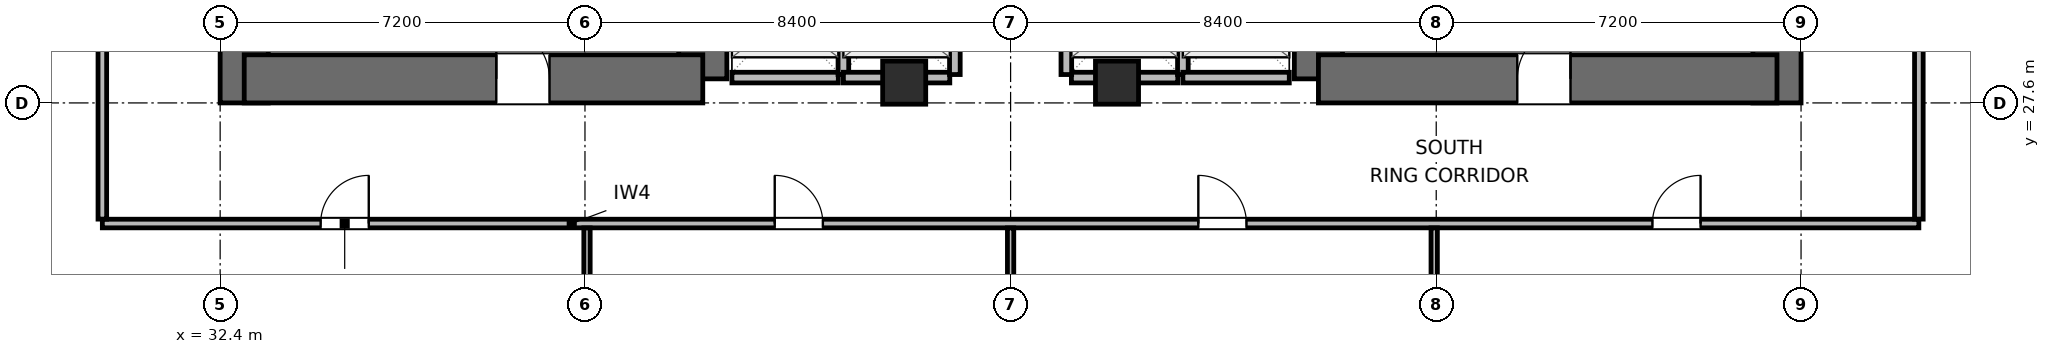
"""IFC4 building model, lengths in metres.
Left out: names, types, materials, properties, quantities, classifications, styles, units other than length and angle.
Written with IfcOpenShell. Run it as: python <this file> out.ifc"""

import sys

from ifc_helpers import new_model, si_unit, direction, frame, frame_2d, origin, origin_2d, place, context, subcontext, project, spatial, rectangle, extrude, element, fill, save


model = new_model("IFC4")
c1 = context("Model", 3, precision=1e-05, world=origin(), true_north=direction((0.0, 1.0)))
c2 = subcontext(c1, "Body", "Model", "MODEL_VIEW")
j1 = project(units=[si_unit("LENGTHUNIT", "METRE"), si_unit("PLANEANGLEUNIT", "RADIAN")], contexts=[c1])
p1 = place(None, origin())
s1 = spatial("IfcSite", under=j1, at=p1, CompositionType="ELEMENT")
p2 = place(p1, origin())
s2 = spatial("IfcBuilding", under=s1, at=p2, CompositionType="ELEMENT")
p3 = place(p2, frame((0.0, 0.0, 33.3)))
s3 = spatial("IfcBuildingStorey", under=s2, at=p3, CompositionType="ELEMENT", Elevation=33.3)
p4 = place(p3, frame((32.875, 27.6, 0.0), z_axis=(0.0, 0.0, 1.0), x_axis=(0.0, 1.0, 0.0)))
e1 = element("IfcWall", 1, at=p4, inside=s3, PredefinedType="SHEAR", context=c2, shape_type="SweptSolid", body=[
    extrude(rectangle(XDim=16.8, YDim=0.95, at=frame_2d((8.4, 0.0))), origin(), (0.0, 0.0, 1.0), 3.9),
])
p5 = place(p3, frame((41.925, 28.075, 0.0), z_axis=(0.0, 0.0, 1.0), x_axis=(0.0, 1.0, 0.0)))
e2 = element("IfcWall", 2, at=p5, inside=s3, PredefinedType="SHEAR", context=c2, shape_type="SweptSolid", body=[
    extrude(rectangle(XDim=6.325, YDim=0.95, at=frame_2d((3.163, 0.0))), origin(), (0.0, 0.0, 1.0), 3.9),
])
p6 = place(p3, frame((32.875, 28.075, 0.0), z_axis=(0.0, 0.0, 1.0), x_axis=(1.0, 0.0, 0.0)))
e3 = element("IfcWall", 3, at=p6, inside=s3, PredefinedType="SHEAR", context=c2, shape_type="SweptSolid", body=[
    extrude(rectangle(XDim=9.05, YDim=0.95, at=frame_2d((4.525, 0.0))), origin(), (0.0, 0.0, 1.0), 3.9),
])
p7 = place(p6, frame((4.975, 0.0, 0.0)))
e4 = element("IfcOpeningElement", 4, at=p7, cuts=e3, PredefinedType="OPENING", context=c2, shape_type="SweptSolid", body=[
    extrude(rectangle(XDim=1.05, YDim=2.04, at=frame_2d((0.525, 1.02))), frame((0.0, 0.485, 0.0), z_axis=(0.0, -1.0, 0.0), x_axis=(1.0, 0.0, 0.0)), (0.0, 0.0, 1.0), 0.97),
])
p8 = place(p3, frame((54.075, 28.075, 0.0), z_axis=(0.0, 0.0, 1.0), x_axis=(0.0, 1.0, 0.0)))
e5 = element("IfcWall", 5, at=p8, inside=s3, PredefinedType="SHEAR", context=c2, shape_type="SweptSolid", body=[
    extrude(rectangle(XDim=7.725, YDim=0.95, at=frame_2d((3.863, 0.0))), origin(), (0.0, 0.0, 1.0), 3.9),
])
p9 = place(p3, frame((63.125, 27.6, 0.0), z_axis=(0.0, 0.0, 1.0), x_axis=(0.0, 1.0, 0.0)))
e6 = element("IfcWall", 6, at=p9, inside=s3, PredefinedType="SHEAR", context=c2, shape_type="SweptSolid", body=[
    extrude(rectangle(XDim=16.8, YDim=0.95, at=frame_2d((8.4, 0.0))), origin(), (0.0, 0.0, 1.0), 3.9),
])
p10 = place(p3, frame((54.075, 28.075, 0.0), z_axis=(0.0, 0.0, 1.0), x_axis=(1.0, 0.0, 0.0)))
e7 = element("IfcWall", 7, at=p10, inside=s3, PredefinedType="SHEAR", context=c2, shape_type="SweptSolid", body=[
    extrude(rectangle(XDim=9.05, YDim=0.95, at=frame_2d((4.525, 0.0))), origin(), (0.0, 0.0, 1.0), 3.9),
])
p11 = place(p10, frame((3.925, 0.0, 0.0)))
e8 = element("IfcOpeningElement", 8, at=p11, cuts=e7, PredefinedType="OPENING", context=c2, shape_type="SweptSolid", body=[
    extrude(rectangle(XDim=1.05, YDim=2.04, at=frame_2d((0.525, 1.02))), frame((0.0, 0.485, 0.0), z_axis=(0.0, -1.0, 0.0), x_axis=(1.0, 0.0, 0.0)), (0.0, 0.0, 1.0), 0.97),
])
for number, where, z_axis, x_axis in (
    (9, (45.9, 28.0, 0.0), (0.0, 0.0, 1.0), (1.0, 0.0, 0.0)),
    (10, (50.1, 28.0, 0.0), (0.0, 0.0, 1.0), (1.0, 0.0, 0.0)),
):
    element("IfcColumn", number, at=place(p3, frame(where, z_axis=z_axis, x_axis=x_axis)), inside=s3, PredefinedType="COLUMN", context=c2, shape_type="SweptSolid", body=[
        extrude(rectangle(XDim=0.85, YDim=0.85, at=origin_2d()), origin(), (0.0, 0.0, 1.0), 3.9),
    ])
p12 = place(p3, frame((42.5, 28.1, 0.0), z_axis=(0.0, 0.0, 1.0), x_axis=(1.0, 0.0, 0.0)))
e11 = element("IfcWall", 11, at=p12, inside=s3, PredefinedType="PARTITIONING", context=c2, shape_type="SweptSolid", body=[
    extrude(rectangle(XDim=2.1, YDim=0.21, at=frame_2d((1.05, 0.0))), origin(), (0.0, 0.0, 1.0), 2.525),
])
p13 = place(p3, frame((44.7, 28.16, 0.0), z_axis=(0.0, 0.0, 1.0), x_axis=(0.0, 1.0, 0.0)))
e12 = element("IfcWall", 12, at=p13, inside=s3, PredefinedType="PARTITIONING", context=c2, shape_type="SweptSolid", body=[
    extrude(rectangle(XDim=2.28, YDim=0.21, at=frame_2d((1.14, 0.0))), origin(), (0.0, 0.0, 1.0), 3.64),
])
p14 = place(p3, frame((44.7, 28.1, 0.0), z_axis=(0.0, 0.0, 1.0), x_axis=(1.0, 0.0, 0.0)))
e13 = element("IfcWall", 13, at=p14, inside=s3, PredefinedType="PARTITIONING", context=c2, shape_type="SweptSolid", body=[
    extrude(rectangle(XDim=2.1, YDim=0.21, at=frame_2d((1.05, 0.0))), origin(), (0.0, 0.0, 1.0), 2.525),
])
p15 = place(p3, frame((46.9, 28.16, 0.0), z_axis=(0.0, 0.0, 1.0), x_axis=(0.0, 1.0, 0.0)))
e14 = element("IfcWall", 14, at=p15, inside=s3, PredefinedType="PARTITIONING", context=c2, shape_type="SweptSolid", body=[
    extrude(rectangle(XDim=2.28, YDim=0.21, at=frame_2d((1.14, 0.0))), origin(), (0.0, 0.0, 1.0), 3.64),
])
p16 = place(p3, frame((49.2, 28.1, 0.0), z_axis=(0.0, 0.0, 1.0), x_axis=(1.0, 0.0, 0.0)))
e15 = element("IfcWall", 15, at=p16, inside=s3, PredefinedType="PARTITIONING", context=c2, shape_type="SweptSolid", body=[
    extrude(rectangle(XDim=2.1, YDim=0.21, at=frame_2d((1.05, 0.0))), origin(), (0.0, 0.0, 1.0), 2.525),
])
for number, where, z_axis, x_axis in (
    (16, (49.1, 28.16, 0.0), (0.0, 0.0, 1.0), (0.0, 1.0, 0.0)),
    (17, (51.4, 28.16, 0.0), (0.0, 0.0, 1.0), (0.0, 1.0, 0.0)),
):
    element("IfcWall", number, at=place(p3, frame(where, z_axis=z_axis, x_axis=x_axis)), inside=s3, PredefinedType="PARTITIONING", context=c2, shape_type="SweptSolid", body=[
        extrude(rectangle(XDim=2.28, YDim=0.21, at=frame_2d((1.14, 0.0))), origin(), (0.0, 0.0, 1.0), 3.64),
    ])
p17 = place(p3, frame((51.4, 28.1, 0.0), z_axis=(0.0, 0.0, 1.0), x_axis=(1.0, 0.0, 0.0)))
e18 = element("IfcWall", 18, at=p17, inside=s3, PredefinedType="PARTITIONING", context=c2, shape_type="SweptSolid", body=[
    extrude(rectangle(XDim=2.1, YDim=0.21, at=frame_2d((1.05, 0.0))), origin(), (0.0, 0.0, 1.0), 2.525),
])
p18 = place(p3, frame((30.075, 25.22, 0.0), z_axis=(0.0, 0.0, 1.0), x_axis=(1.0, 0.0, 0.0)))
e19 = element("IfcWall", 19, at=p18, inside=s3, PredefinedType="PARTITIONING", context=c2, shape_type="SweptSolid", body=[
    extrude(rectangle(XDim=35.85, YDim=0.17, at=frame_2d((17.925, 0.0))), origin(), (0.0, 0.0, 1.0), 3.64),
])
p19 = place(p18, frame((4.308, 0.0, 0.0)))
e20 = element("IfcOpeningElement", 20, at=p19, cuts=e19, PredefinedType="OPENING", context=c2, shape_type="SweptSolid", body=[
    extrude(rectangle(XDim=0.95, YDim=2.04, at=frame_2d((0.475, 1.02))), frame((0.0, 0.095, 0.0), z_axis=(0.0, -1.0, 0.0), x_axis=(1.0, 0.0, 0.0)), (0.0, 0.0, 1.0), 0.19),
])
p20 = place(p18, frame((13.27, 0.0, 0.0)))
e21 = element("IfcOpeningElement", 21, at=p20, cuts=e19, PredefinedType="OPENING", context=c2, shape_type="SweptSolid", body=[
    extrude(rectangle(XDim=0.95, YDim=2.04, at=frame_2d((0.475, 1.02))), frame((0.0, 0.095, 0.0), z_axis=(0.0, -1.0, 0.0), x_axis=(1.0, 0.0, 0.0)), (0.0, 0.0, 1.0), 0.19),
])
p21 = place(p18, frame((21.63, 0.0, 0.0)))
e22 = element("IfcOpeningElement", 22, at=p21, cuts=e19, PredefinedType="OPENING", context=c2, shape_type="SweptSolid", body=[
    extrude(rectangle(XDim=0.95, YDim=2.04, at=frame_2d((0.475, 1.02))), frame((0.0, 0.095, 0.0), z_axis=(0.0, -1.0, 0.0), x_axis=(1.0, 0.0, 0.0)), (0.0, 0.0, 1.0), 0.19),
])
p22 = place(p18, frame((30.592, 0.0, 0.0)))
e23 = element("IfcOpeningElement", 23, at=p22, cuts=e19, PredefinedType="OPENING", context=c2, shape_type="SweptSolid", body=[
    extrude(rectangle(XDim=0.95, YDim=2.04, at=frame_2d((0.475, 1.02))), frame((0.0, 0.095, 0.0), z_axis=(0.0, -1.0, 0.0), x_axis=(1.0, 0.0, 0.0)), (0.0, 0.0, 1.0), 0.19),
])
p23 = place(p3, frame((30.075, 25.307, 0.0), z_axis=(0.0, 0.0, 1.0), x_axis=(0.0, 1.0, 0.0)))
e24 = element("IfcWall", 24, at=p23, inside=s3, PredefinedType="PARTITIONING", context=c2, shape_type="SweptSolid", body=[
    extrude(rectangle(XDim=21.386, YDim=0.17, at=frame_2d((10.693, 0.0))), origin(), (0.0, 0.0, 1.0), 3.64),
])
p24 = place(p23, frame((3.528, 0.0, 0.0)))
e25 = element("IfcOpeningElement", 25, at=p24, cuts=e24, PredefinedType="OPENING", context=c2, shape_type="SweptSolid", body=[
    extrude(rectangle(XDim=0.95, YDim=2.04, at=frame_2d((0.475, 1.02))), frame((0.0, 0.095, 0.0), z_axis=(0.0, -1.0, 0.0), x_axis=(1.0, 0.0, 0.0)), (0.0, 0.0, 1.0), 0.19),
])
p25 = place(p23, frame((10.818, 0.0, 0.0)))
e26 = element("IfcOpeningElement", 26, at=p25, cuts=e24, PredefinedType="OPENING", context=c2, shape_type="SweptSolid", body=[
    extrude(rectangle(XDim=0.95, YDim=2.04, at=frame_2d((0.475, 1.02))), frame((0.0, 0.095, 0.0), z_axis=(0.0, -1.0, 0.0), x_axis=(1.0, 0.0, 0.0)), (0.0, 0.0, 1.0), 0.19),
])
p26 = place(p23, frame((17.508, 0.0, 0.0)))
e27 = element("IfcOpeningElement", 27, at=p26, cuts=e24, PredefinedType="OPENING", context=c2, shape_type="SweptSolid", body=[
    extrude(rectangle(XDim=0.95, YDim=2.04, at=frame_2d((0.475, 1.02))), frame((0.0, 0.095, 0.0), z_axis=(0.0, -1.0, 0.0), x_axis=(1.0, 0.0, 0.0)), (0.0, 0.0, 1.0), 0.19),
])
p27 = place(p3, frame((65.925, 25.307, 0.0), z_axis=(0.0, 0.0, 1.0), x_axis=(0.0, 1.0, 0.0)))
e28 = element("IfcWall", 28, at=p27, inside=s3, PredefinedType="PARTITIONING", context=c2, shape_type="SweptSolid", body=[
    extrude(rectangle(XDim=21.386, YDim=0.17, at=frame_2d((10.693, 0.0))), origin(), (0.0, 0.0, 1.0), 3.64),
])
p28 = place(p27, frame((5.428, 0.0, 0.0)))
e29 = element("IfcOpeningElement", 29, at=p28, cuts=e28, PredefinedType="OPENING", context=c2, shape_type="SweptSolid", body=[
    extrude(rectangle(XDim=0.95, YDim=2.04, at=frame_2d((0.475, 1.02))), frame((0.0, 0.095, 0.0), z_axis=(0.0, -1.0, 0.0), x_axis=(1.0, 0.0, 0.0)), (0.0, 0.0, 1.0), 0.19),
])
p29 = place(p27, frame((16.208, 0.0, 0.0)))
e30 = element("IfcOpeningElement", 30, at=p29, cuts=e28, PredefinedType="OPENING", context=c2, shape_type="SweptSolid", body=[
    extrude(rectangle(XDim=0.95, YDim=2.04, at=frame_2d((0.475, 1.02))), frame((0.0, 0.095, 0.0), z_axis=(0.0, -1.0, 0.0), x_axis=(1.0, 0.0, 0.0)), (0.0, 0.0, 1.0), 0.19),
])
p30 = place(p3, frame((39.64, 9.915, 0.0), z_axis=(0.0, 0.0, 1.0), x_axis=(0.0, 1.0, 0.0)))
e31 = element("IfcWall", 31, at=p30, inside=s3, PredefinedType="PARTITIONING", context=c2, shape_type="SweptSolid", body=[
    extrude(rectangle(XDim=15.218, YDim=0.125, at=frame_2d((7.609, 0.0))), origin(), (0.0, 0.0, 1.0), 2.93),
])
p31 = place(p3, frame((48.0, 11.515, 0.0), z_axis=(0.0, 0.0, 1.0), x_axis=(0.0, 1.0, 0.0)))
e32 = element("IfcWall", 32, at=p31, inside=s3, PredefinedType="PARTITIONING", context=c2, shape_type="SweptSolid", body=[
    extrude(rectangle(XDim=13.618, YDim=0.125, at=frame_2d((6.809, 0.0))), origin(), (0.0, 0.0, 1.0), 2.93),
])
p32 = place(p3, frame((56.36, 9.915, 0.0), z_axis=(0.0, 0.0, 1.0), x_axis=(0.0, 1.0, 0.0)))
e33 = element("IfcWall", 33, at=p32, inside=s3, PredefinedType="PARTITIONING", context=c2, shape_type="SweptSolid", body=[
    extrude(rectangle(XDim=15.218, YDim=0.125, at=frame_2d((7.609, 0.0))), origin(), (0.0, 0.0, 1.0), 2.93),
])
p33 = place(p7, origin())
e34 = element("IfcDoor", 34, at=p33, inside=s3, OperationType="SINGLE_SWING_LEFT", PredefinedType="DOOR", context=c2, shape_type="SweptSolid", body=[
    extrude(rectangle(XDim=1.05, YDim=2.04, at=frame_2d((0.525, 1.02))), frame((0.0, 0.025, 0.0), z_axis=(0.0, -1.0, 0.0), x_axis=(1.0, 0.0, 0.0)), (0.0, 0.0, 1.0), 0.05),
])
fill(e4, e34)
p34 = place(p11, origin())
e35 = element("IfcDoor", 35, at=p34, inside=s3, OperationType="SINGLE_SWING_RIGHT", PredefinedType="DOOR", context=c2, shape_type="SweptSolid", body=[
    extrude(rectangle(XDim=1.05, YDim=2.04, at=frame_2d((0.525, 1.02))), frame((0.0, 0.025, 0.0), z_axis=(0.0, -1.0, 0.0), x_axis=(1.0, 0.0, 0.0)), (0.0, 0.0, 1.0), 0.05),
])
fill(e8, e35)
p35 = place(p19, origin())
e36 = element("IfcDoor", 36, at=p35, inside=s3, OperationType="SINGLE_SWING_RIGHT", PredefinedType="DOOR", context=c2, shape_type="SweptSolid", body=[
    extrude(rectangle(XDim=0.95, YDim=2.04, at=frame_2d((0.475, 1.02))), frame((0.0, 0.025, 0.0), z_axis=(0.0, -1.0, 0.0), x_axis=(1.0, 0.0, 0.0)), (0.0, 0.0, 1.0), 0.05),
])
fill(e20, e36)
p36 = place(p20, origin())
e37 = element("IfcDoor", 37, at=p36, inside=s3, OperationType="SINGLE_SWING_LEFT", PredefinedType="DOOR", context=c2, shape_type="SweptSolid", body=[
    extrude(rectangle(XDim=0.95, YDim=2.04, at=frame_2d((0.475, 1.02))), frame((0.0, 0.025, 0.0), z_axis=(0.0, -1.0, 0.0), x_axis=(1.0, 0.0, 0.0)), (0.0, 0.0, 1.0), 0.05),
])
fill(e21, e37)
p37 = place(p21, origin())
e38 = element("IfcDoor", 38, at=p37, inside=s3, OperationType="SINGLE_SWING_LEFT", PredefinedType="DOOR", context=c2, shape_type="SweptSolid", body=[
    extrude(rectangle(XDim=0.95, YDim=2.04, at=frame_2d((0.475, 1.02))), frame((0.0, 0.025, 0.0), z_axis=(0.0, -1.0, 0.0), x_axis=(1.0, 0.0, 0.0)), (0.0, 0.0, 1.0), 0.05),
])
fill(e22, e38)
p38 = place(p22, origin())
e39 = element("IfcDoor", 39, at=p38, inside=s3, OperationType="SINGLE_SWING_RIGHT", PredefinedType="DOOR", context=c2, shape_type="SweptSolid", body=[
    extrude(rectangle(XDim=0.95, YDim=2.04, at=frame_2d((0.475, 1.02))), frame((0.0, 0.025, 0.0), z_axis=(0.0, -1.0, 0.0), x_axis=(1.0, 0.0, 0.0)), (0.0, 0.0, 1.0), 0.05),
])
fill(e23, e39)
save(model, sys.argv[1])
